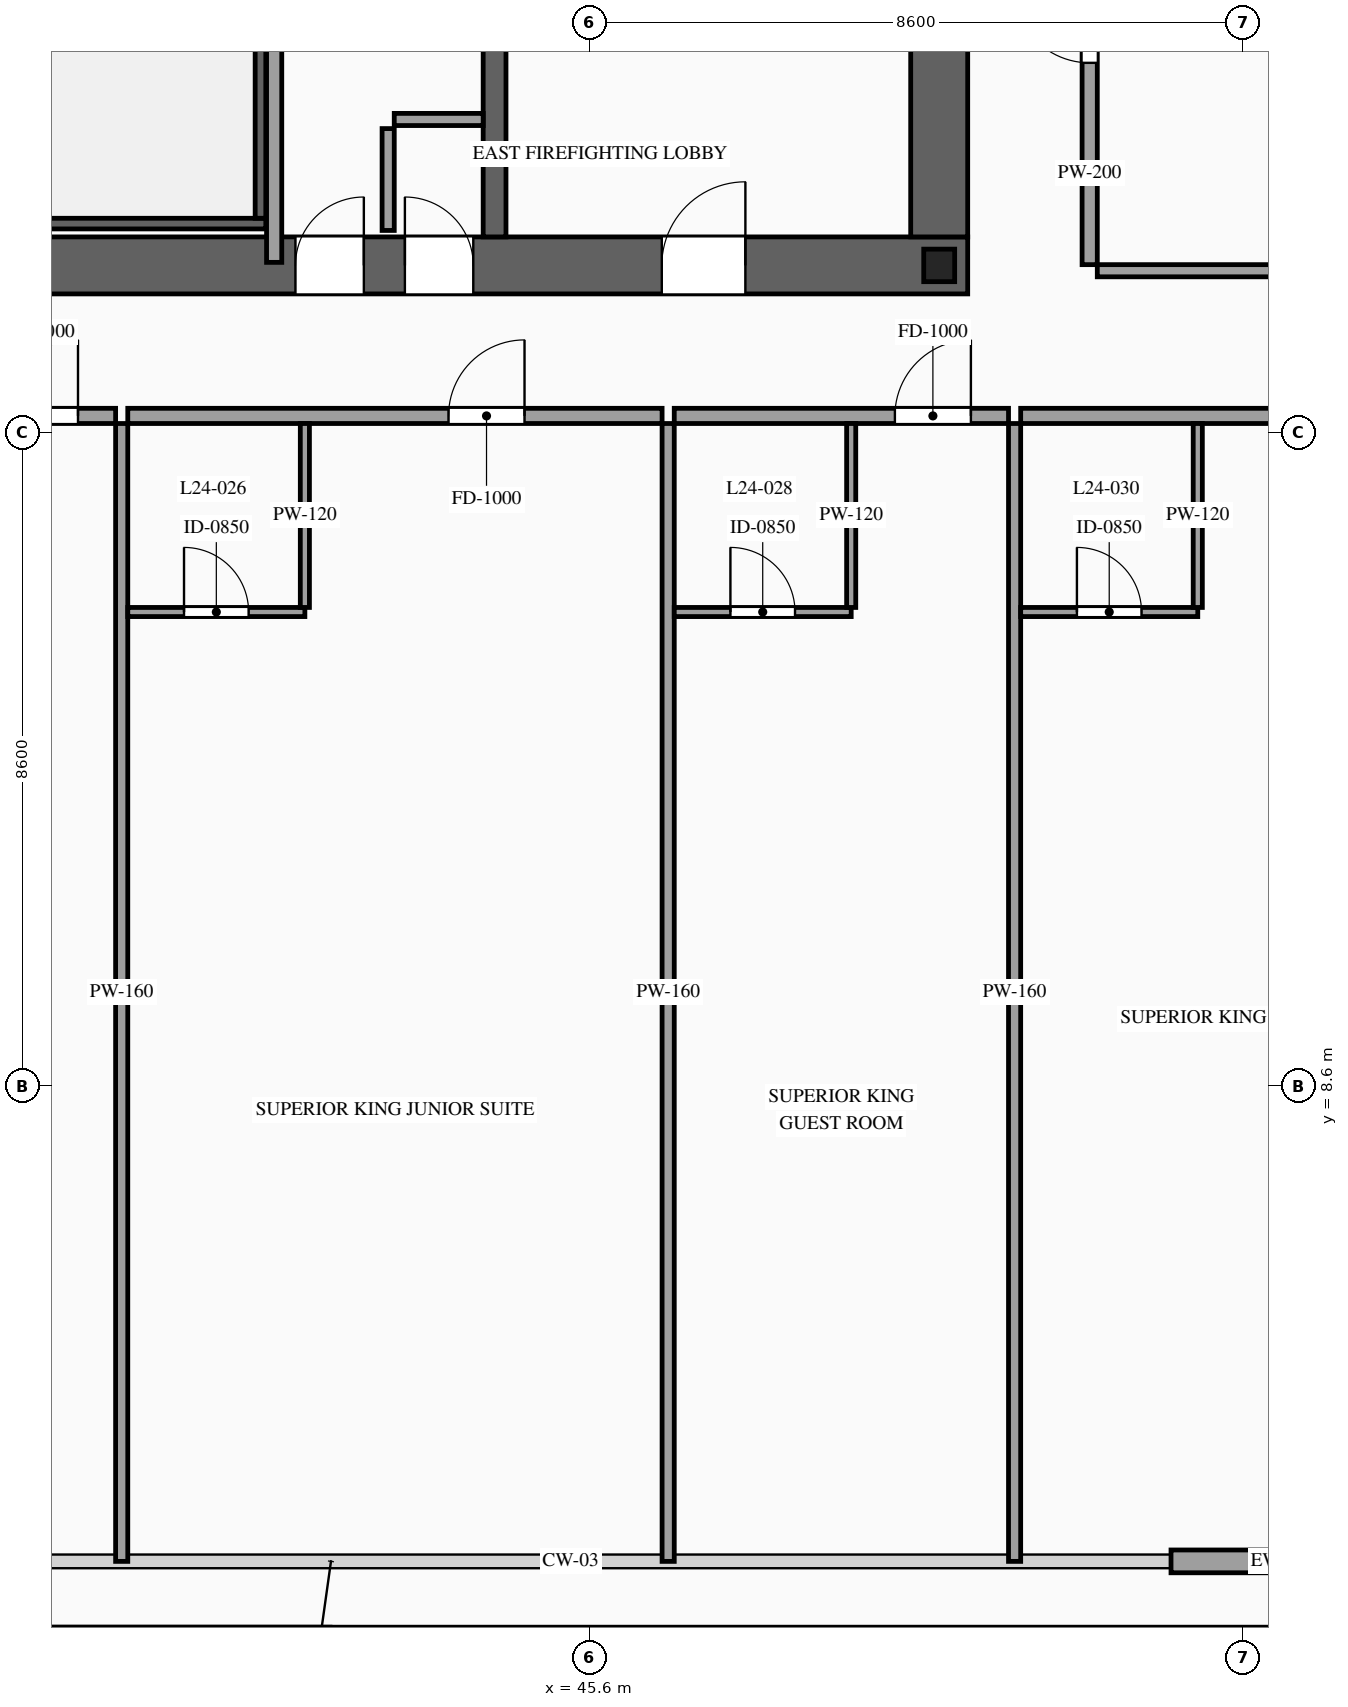
"""IFC4 building model, lengths in metres.
Left out: names, types, materials, properties, quantities, classifications, styles, units other than length and angle.
Written with IfcOpenShell. Run it as: python <this file> out.ifc"""

import sys

from ifc_helpers import new_model, si_unit, direction, frame, frame_2d, origin, origin_2d, place, context, subcontext, project, spatial, rectangle, i_section, extrude, source, transform, mapped, element, fill, save


model = new_model("IFC4")
c1 = context("Model", 3, precision=1e-05, world=origin(), true_north=direction((0.0, 1.0)))
c2 = subcontext(c1, "Body", "Model", "MODEL_VIEW")
j1 = project(units=[si_unit("LENGTHUNIT", "METRE"), si_unit("PLANEANGLEUNIT", "RADIAN")], contexts=[c1])
p1 = place(None, origin())
s1 = spatial("IfcSite", under=j1, at=p1, CompositionType="ELEMENT")
p2 = place(p1, origin())
s2 = spatial("IfcBuilding", under=s1, at=p2, CompositionType="ELEMENT")
p3 = place(p2, frame((0.0, 0.0, 93.8)))
s3 = spatial("IfcBuildingStorey", under=s2, at=p3, CompositionType="ELEMENT", Elevation=93.8)
p4 = place(p3, frame((23.425, 19.4, 0.0), z_axis=(0.0, 0.0, 1.0), x_axis=(1.0, 0.0, 0.0)))
e1 = element("IfcWall", 1, at=p4, inside=s3, PredefinedType="SHEAR", context=c2, shape_type="SweptSolid", body=[
    extrude(rectangle(XDim=27.15, YDim=0.75, at=frame_2d((13.575, 0.0))), origin(), (0.0, 0.0, 1.0), 3.6),
])
p5 = place(p4, frame((2.025, 0.0, 0.0)))
e2 = element("IfcOpeningElement", 2, at=p5, cuts=e1, PredefinedType="OPENING", context=c2, shape_type="SweptSolid", body=[
    extrude(rectangle(XDim=1.1, YDim=2.2, at=frame_2d((0.55, 1.1))), frame((0.0, 0.39, 0.0), z_axis=(0.0, -1.0, 0.0), x_axis=(1.0, 0.0, 0.0)), (0.0, 0.0, 1.0), 0.78),
])
p6 = place(p4, frame((9.925, 0.0, 0.0)))
e3 = element("IfcOpeningElement", 3, at=p6, cuts=e1, PredefinedType="OPENING", context=c2, shape_type="SweptSolid", body=[
    extrude(rectangle(XDim=1.1, YDim=2.2, at=frame_2d((0.55, 1.1))), frame((0.0, 0.39, 0.0), z_axis=(0.0, -1.0, 0.0), x_axis=(1.0, 0.0, 0.0)), (0.0, 0.0, 1.0), 0.78),
])
p7 = place(p4, frame((23.125, 0.0, 0.0)))
e4 = element("IfcOpeningElement", 4, at=p7, cuts=e1, PredefinedType="OPENING", context=c2, shape_type="SweptSolid", body=[
    extrude(rectangle(XDim=1.1, YDim=2.2, at=frame_2d((0.55, 1.1))), frame((0.0, 0.39, 0.0), z_axis=(0.0, -1.0, 0.0), x_axis=(1.0, 0.0, 0.0)), (0.0, 0.0, 1.0), 0.78),
])
p8 = place(p4, frame((19.745, 0.0, 0.0)))
e5 = element("IfcOpeningElement", 5, at=p8, cuts=e1, PredefinedType="OPENING", context=c2, shape_type="SweptSolid", body=[
    extrude(rectangle(XDim=0.9, YDim=2.15, at=frame_2d((0.45, 1.075))), frame((0.0, 0.39, 0.0), z_axis=(0.0, -1.0, 0.0), x_axis=(1.0, 0.0, 0.0)), (0.0, 0.0, 1.0), 0.78),
])
p9 = place(p4, frame((18.305, 0.0, 0.0)))
e6 = element("IfcOpeningElement", 6, at=p9, cuts=e1, PredefinedType="OPENING", context=c2, shape_type="SweptSolid", body=[
    extrude(rectangle(XDim=0.9, YDim=2.15, at=frame_2d((0.45, 1.075))), frame((0.0, 0.39, 0.0), z_axis=(0.0, -1.0, 0.0), x_axis=(1.0, 0.0, 0.0)), (0.0, 0.0, 1.0), 0.78),
])
m1 = source(origin(), c2, "Body", "SweptSolid", [
    extrude(rectangle(XDim=12.05, YDim=0.75, at=frame_2d((6.025, 0.0))), origin(), (0.0, 0.0, 1.0), 3.6),
])
p10 = place(p3, frame((50.2, 19.775, 0.0), z_axis=(0.0, 0.0, 1.0), x_axis=(0.0, 1.0, 0.0)))
e7 = element("IfcWall", 7, at=p10, inside=s3, PredefinedType="SHEAR", context=c2, shape_type="MappedRepresentation", body=[
    mapped(m1, transform((0.0, 0.0, 0.0), scale=1.0)),
])
m2 = source(origin(), c2, "Body", "SweptSolid", [
    extrude(rectangle(XDim=12.05, YDim=0.3, at=frame_2d((6.025, 0.0))), origin(), (0.0, 0.0, 1.0), 3.6),
])
p11 = place(p3, frame((44.35, 19.775, 0.0), z_axis=(0.0, 0.0, 1.0), x_axis=(0.0, 1.0, 0.0)))
e8 = element("IfcWall", 8, at=p11, inside=s3, PredefinedType="SOLIDWALL", context=c2, shape_type="MappedRepresentation", body=[
    mapped(m2, transform((0.0, 0.0, 0.0), scale=1.0)),
])
m3 = source(origin(), c2, "Body", "SweptSolid", [
    extrude(i_section(OverallWidth=0.407, OverallDepth=0.428, WebThickness=0.02, FlangeThickness=0.035, at=origin_2d()), origin(), (0.0, 0.0, 1.0), 3.6),
])
p12 = place(p3, frame((50.2, 19.4, 0.0), z_axis=(0.0, 0.0, 1.0), x_axis=(1.0, 0.0, 0.0)))
e9 = element("IfcColumn", 9, at=p12, inside=s3, PredefinedType="COLUMN", context=c2, shape_type="MappedRepresentation", body=[
    mapped(m3, transform((0.0, 0.0, 0.0), scale=1.0)),
])
m4 = source(origin(), c2, "Body", "SweptSolid", [
    extrude(rectangle(XDim=2.95, YDim=0.3, at=frame_2d((1.475, 0.0))), origin(), (0.0, 0.0, 1.0), 2.775),
])
p13 = place(p3, frame((53.25, 2.35, 0.0), z_axis=(0.0, 0.0, 1.0), x_axis=(1.0, 0.0, 0.0)))
e10 = element("IfcWall", 10, at=p13, inside=s3, PredefinedType="SOLIDWALL", context=c2, shape_type="MappedRepresentation", body=[
    mapped(m4, transform((0.0, 0.0, 0.0), scale=1.0)),
])
m5 = source(origin(), c2, "Body", "SweptSolid", [
    extrude(rectangle(XDim=3.14, YDim=0.14, at=frame_2d((1.57, 0.0))), origin(), (0.0, 0.0, 1.0), 3.38),
])
p14 = place(p3, frame((38.2, 19.95, 0.0), z_axis=(0.0, 0.0, 1.0), x_axis=(1.0, 0.0, 0.0)))
e11 = element("IfcWall", 11, at=p14, inside=s3, PredefinedType="SOLIDWALL", context=c2, shape_type="MappedRepresentation", body=[
    mapped(m5, transform((0.0, 0.0, 0.0), scale=1.0)),
])
m6 = source(origin(), c2, "Body", "SweptSolid", [
    extrude(rectangle(XDim=8.94, YDim=0.14, at=frame_2d((4.47, 0.0))), origin(), (0.0, 0.0, 1.0), 3.38),
])
p15 = place(p3, frame((41.27, 20.02, 0.0), z_axis=(0.0, 0.0, 1.0), x_axis=(0.0, 1.0, 0.0)))
e12 = element("IfcWall", 12, at=p15, inside=s3, PredefinedType="SOLIDWALL", context=c2, shape_type="MappedRepresentation", body=[
    mapped(m6, transform((0.0, 0.0, 0.0), scale=1.0)),
])
m7 = source(origin(), c2, "Body", "SweptSolid", [
    extrude(rectangle(XDim=1.34, YDim=0.16, at=frame_2d((0.67, 0.0))), origin(), (0.0, 0.0, 1.0), 3.38),
])
p16 = place(p3, frame((42.95, 19.86, 0.0), z_axis=(0.0, 0.0, 1.0), x_axis=(0.0, 1.0, 0.0)))
e13 = element("IfcWall", 13, at=p16, inside=s3, PredefinedType="PARTITIONING", context=c2, shape_type="MappedRepresentation", body=[
    mapped(m7, transform((0.0, 0.0, 0.0), scale=1.0)),
])
m8 = source(origin(), c2, "Body", "SweptSolid", [
    extrude(rectangle(XDim=1.17, YDim=0.16, at=frame_2d((0.585, 0.0))), origin(), (0.0, 0.0, 1.0), 3.38),
])
p17 = place(p3, frame((43.03, 21.32, 0.0), z_axis=(0.0, 0.0, 1.0), x_axis=(1.0, 0.0, 0.0)))
e14 = element("IfcWall", 14, at=p17, inside=s3, PredefinedType="PARTITIONING", context=c2, shape_type="MappedRepresentation", body=[
    mapped(m8, transform((0.0, 0.0, 0.0), scale=1.0)),
])
m9 = source(origin(), c2, "Body", "SweptSolid", [
    extrude(rectangle(XDim=6.51, YDim=0.2, at=frame_2d((3.255, 0.0))), origin(), (0.0, 0.0, 1.0), 3.38),
])
p18 = place(p3, frame((41.45, 19.44, 0.0), z_axis=(0.0, 0.0, 1.0), x_axis=(0.0, 1.0, 0.0)))
e15 = element("IfcWall", 15, at=p18, inside=s3, PredefinedType="PARTITIONING", context=c2, shape_type="MappedRepresentation", body=[
    mapped(m9, transform((0.0, 0.0, 0.0), scale=1.0)),
])
p19 = place(p3, frame((34.965, 17.42, 0.0), z_axis=(0.0, 0.0, 1.0), x_axis=(1.0, 0.0, 0.0)))
e16 = element("IfcWall", 16, at=p19, inside=s3, PredefinedType="PARTITIONING", context=c2, shape_type="SweptSolid", body=[
    extrude(rectangle(XDim=4.399, YDim=0.2, at=frame_2d((2.199, 0.0))), origin(), (0.0, 0.0, 1.0), 3.38),
])
p20 = place(p19, frame((2.904, 0.0, 0.0)))
e17 = element("IfcOpeningElement", 17, at=p20, cuts=e16, PredefinedType="OPENING", context=c2, shape_type="SweptSolid", body=[
    extrude(rectangle(XDim=1.0, YDim=2.2, at=frame_2d((0.5, 1.1))), frame((0.0, 0.115, 0.0), z_axis=(0.0, -1.0, 0.0), x_axis=(1.0, 0.0, 0.0)), (0.0, 0.0, 1.0), 0.23),
])
m10 = source(origin(), c2, "Body", "SweptSolid", [
    extrude(rectangle(XDim=14.97, YDim=0.16, at=frame_2d((7.485, 0.0))), origin(), (0.0, 0.0, 1.0), 3.38),
])
p21 = place(p3, frame((39.444, 2.35, 0.0), z_axis=(0.0, 0.0, 1.0), x_axis=(0.0, 1.0, 0.0)))
e18 = element("IfcWall", 18, at=p21, inside=s3, PredefinedType="PARTITIONING", context=c2, shape_type="MappedRepresentation", body=[
    mapped(m10, transform((0.0, 0.0, 0.0), scale=1.0)),
])
p22 = place(p3, frame((39.524, 17.42, 0.0), z_axis=(0.0, 0.0, 1.0), x_axis=(1.0, 0.0, 0.0)))
e19 = element("IfcWall", 19, at=p22, inside=s3, PredefinedType="PARTITIONING", context=c2, shape_type="SweptSolid", body=[
    extrude(rectangle(XDim=7.03, YDim=0.2, at=frame_2d((3.515, 0.0))), origin(), (0.0, 0.0, 1.0), 3.38),
])
p23 = place(p22, frame((4.22, 0.0, 0.0)))
e20 = element("IfcOpeningElement", 20, at=p23, cuts=e19, PredefinedType="OPENING", context=c2, shape_type="SweptSolid", body=[
    extrude(rectangle(XDim=1.0, YDim=2.2, at=frame_2d((0.5, 1.1))), frame((0.0, 0.115, 0.0), z_axis=(0.0, -1.0, 0.0), x_axis=(1.0, 0.0, 0.0)), (0.0, 0.0, 1.0), 0.23),
])
p24 = place(p3, frame((46.634, 2.35, 0.0), z_axis=(0.0, 0.0, 1.0), x_axis=(0.0, 1.0, 0.0)))
e21 = element("IfcWall", 21, at=p24, inside=s3, PredefinedType="PARTITIONING", context=c2, shape_type="MappedRepresentation", body=[
    mapped(m10, transform((0.0, 0.0, 0.0), scale=1.0)),
])
p25 = place(p3, frame((39.524, 14.84, 0.0), z_axis=(0.0, 0.0, 1.0), x_axis=(1.0, 0.0, 0.0)))
e22 = element("IfcWall", 22, at=p25, inside=s3, PredefinedType="PARTITIONING", context=c2, shape_type="SweptSolid", body=[
    extrude(rectangle(XDim=2.33, YDim=0.12, at=frame_2d((1.165, 0.0))), origin(), (0.0, 0.0, 1.0), 3.38),
])
p26 = place(p25, frame((0.74, 0.0, 0.0)))
e23 = element("IfcOpeningElement", 23, at=p26, cuts=e22, PredefinedType="OPENING", context=c2, shape_type="SweptSolid", body=[
    extrude(rectangle(XDim=0.85, YDim=2.1, at=frame_2d((0.425, 1.05))), frame((0.0, 0.075, 0.0), z_axis=(0.0, -1.0, 0.0), x_axis=(1.0, 0.0, 0.0)), (0.0, 0.0, 1.0), 0.15),
])
m11 = source(origin(), c2, "Body", "SweptSolid", [
    extrude(rectangle(XDim=2.42, YDim=0.12, at=frame_2d((1.21, 0.0))), origin(), (0.0, 0.0, 1.0), 3.38),
])
p27 = place(p3, frame((41.854, 14.9, 0.0), z_axis=(0.0, 0.0, 1.0), x_axis=(0.0, 1.0, 0.0)))
e24 = element("IfcWall", 24, at=p27, inside=s3, PredefinedType="PARTITIONING", context=c2, shape_type="MappedRepresentation", body=[
    mapped(m11, transform((0.0, 0.0, 0.0), scale=1.0)),
])
p28 = place(p3, frame((46.714, 17.42, 0.0), z_axis=(0.0, 0.0, 1.0), x_axis=(1.0, 0.0, 0.0)))
e25 = element("IfcWall", 25, at=p28, inside=s3, PredefinedType="PARTITIONING", context=c2, shape_type="SweptSolid", body=[
    extrude(rectangle(XDim=4.398, YDim=0.2, at=frame_2d((2.199, 0.0))), origin(), (0.0, 0.0, 1.0), 3.38),
])
p29 = place(p28, frame((2.903, 0.0, 0.0)))
e26 = element("IfcOpeningElement", 26, at=p29, cuts=e25, PredefinedType="OPENING", context=c2, shape_type="SweptSolid", body=[
    extrude(rectangle(XDim=1.0, YDim=2.2, at=frame_2d((0.5, 1.1))), frame((0.0, 0.115, 0.0), z_axis=(0.0, -1.0, 0.0), x_axis=(1.0, 0.0, 0.0)), (0.0, 0.0, 1.0), 0.23),
])
p30 = place(p3, frame((51.192, 2.35, 0.0), z_axis=(0.0, 0.0, 1.0), x_axis=(0.0, 1.0, 0.0)))
e27 = element("IfcWall", 27, at=p30, inside=s3, PredefinedType="PARTITIONING", context=c2, shape_type="MappedRepresentation", body=[
    mapped(m10, transform((0.0, 0.0, 0.0), scale=1.0)),
])
p31 = place(p3, frame((46.714, 14.84, 0.0), z_axis=(0.0, 0.0, 1.0), x_axis=(1.0, 0.0, 0.0)))
e28 = element("IfcWall", 28, at=p31, inside=s3, PredefinedType="PARTITIONING", context=c2, shape_type="SweptSolid", body=[
    extrude(rectangle(XDim=2.328, YDim=0.12, at=frame_2d((1.164, 0.0))), origin(), (0.0, 0.0, 1.0), 3.38),
])
p32 = place(p31, frame((0.739, 0.0, 0.0)))
e29 = element("IfcOpeningElement", 29, at=p32, cuts=e28, PredefinedType="OPENING", context=c2, shape_type="SweptSolid", body=[
    extrude(rectangle(XDim=0.85, YDim=2.1, at=frame_2d((0.425, 1.05))), frame((0.0, 0.075, 0.0), z_axis=(0.0, -1.0, 0.0), x_axis=(1.0, 0.0, 0.0)), (0.0, 0.0, 1.0), 0.15),
])
p33 = place(p3, frame((49.042, 14.9, 0.0), z_axis=(0.0, 0.0, 1.0), x_axis=(0.0, 1.0, 0.0)))
e30 = element("IfcWall", 30, at=p33, inside=s3, PredefinedType="PARTITIONING", context=c2, shape_type="MappedRepresentation", body=[
    mapped(m11, transform((0.0, 0.0, 0.0), scale=1.0)),
])
p34 = place(p3, frame((51.272, 17.42, 0.0), z_axis=(0.0, 0.0, 1.0), x_axis=(1.0, 0.0, 0.0)))
e31 = element("IfcWall", 31, at=p34, inside=s3, PredefinedType="PARTITIONING", context=c2, shape_type="SweptSolid", body=[
    extrude(rectangle(XDim=6.288, YDim=0.2, at=frame_2d((3.144, 0.0))), origin(), (0.0, 0.0, 1.0), 3.38),
])
p35 = place(p34, frame((3.849, 0.0, 0.0)))
e32 = element("IfcOpeningElement", 32, at=p35, cuts=e31, PredefinedType="OPENING", context=c2, shape_type="SweptSolid", body=[
    extrude(rectangle(XDim=1.0, YDim=2.2, at=frame_2d((0.5, 1.1))), frame((0.0, 0.115, 0.0), z_axis=(0.0, -1.0, 0.0), x_axis=(1.0, 0.0, 0.0)), (0.0, 0.0, 1.0), 0.23),
])
p36 = place(p3, frame((51.272, 14.84, 0.0), z_axis=(0.0, 0.0, 1.0), x_axis=(1.0, 0.0, 0.0)))
e33 = element("IfcWall", 33, at=p36, inside=s3, PredefinedType="PARTITIONING", context=c2, shape_type="SweptSolid", body=[
    extrude(rectangle(XDim=2.33, YDim=0.12, at=frame_2d((1.165, 0.0))), origin(), (0.0, 0.0, 1.0), 3.38),
])
p37 = place(p36, frame((0.74, 0.0, 0.0)))
e34 = element("IfcOpeningElement", 34, at=p37, cuts=e33, PredefinedType="OPENING", context=c2, shape_type="SweptSolid", body=[
    extrude(rectangle(XDim=0.85, YDim=2.1, at=frame_2d((0.425, 1.05))), frame((0.0, 0.075, 0.0), z_axis=(0.0, -1.0, 0.0), x_axis=(1.0, 0.0, 0.0)), (0.0, 0.0, 1.0), 0.15),
])
p38 = place(p3, frame((53.602, 14.9, 0.0), z_axis=(0.0, 0.0, 1.0), x_axis=(0.0, 1.0, 0.0)))
e35 = element("IfcWall", 35, at=p38, inside=s3, PredefinedType="PARTITIONING", context=c2, shape_type="MappedRepresentation", body=[
    mapped(m11, transform((0.0, 0.0, 0.0), scale=1.0)),
])
p39 = place(p3, frame((52.18, 19.41, 0.0), z_axis=(0.0, 0.0, 1.0), x_axis=(0.0, 1.0, 0.0)))
e36 = element("IfcWall", 36, at=p39, inside=s3, PredefinedType="PARTITIONING", context=c2, shape_type="SweptSolid", body=[
    extrude(rectangle(XDim=6.31, YDim=0.2, at=frame_2d((3.155, 0.0))), origin(), (0.0, 0.0, 1.0), 3.38),
])
p40 = place(p39, frame((2.655, 0.0, 0.0)))
e37 = element("IfcOpeningElement", 37, at=p40, cuts=e36, PredefinedType="OPENING", context=c2, shape_type="SweptSolid", body=[
    extrude(rectangle(XDim=1.0, YDim=2.2, at=frame_2d((0.5, 1.1))), frame((0.0, 0.115, 0.0), z_axis=(0.0, -1.0, 0.0), x_axis=(1.0, 0.0, 0.0)), (0.0, 0.0, 1.0), 0.23),
])
m12 = source(origin(), c2, "Body", "SweptSolid", [
    extrude(rectangle(XDim=8.17, YDim=0.16, at=frame_2d((4.085, 0.0))), origin(), (0.0, 0.0, 1.0), 2.875),
])
p41 = place(p3, frame((52.28, 19.33, 0.0), z_axis=(0.0, 0.0, 1.0), x_axis=(1.0, 0.0, 0.0)))
e38 = element("IfcWall", 38, at=p41, inside=s3, PredefinedType="PARTITIONING", context=c2, shape_type="MappedRepresentation", body=[
    mapped(m12, transform((0.0, 0.0, 0.0), scale=1.0)),
])
m13 = source(origin(), c2, "Body", "SweptSolid", [
    extrude(rectangle(XDim=1.1, YDim=2.2, at=frame_2d((0.55, 1.1))), frame((0.0, 0.025, 0.0), z_axis=(0.0, -1.0, 0.0), x_axis=(1.0, 0.0, 0.0)), (0.0, 0.0, 1.0), 0.05),
])
p42 = place(p7, origin())
e39 = element("IfcDoor", 39, at=p42, inside=s3, OperationType="SINGLE_SWING_RIGHT", PredefinedType="DOOR", context=c2, shape_type="MappedRepresentation", body=[
    mapped(m13, transform((0.0, 0.0, 0.0), scale=1.0)),
])
fill(e4, e39)
m14 = source(origin(), c2, "Body", "SweptSolid", [
    extrude(rectangle(XDim=0.9, YDim=2.15, at=frame_2d((0.45, 1.075))), frame((0.0, 0.025, 0.0), z_axis=(0.0, -1.0, 0.0), x_axis=(1.0, 0.0, 0.0)), (0.0, 0.0, 1.0), 0.05),
])
p43 = place(p8, origin())
e40 = element("IfcDoor", 40, at=p43, inside=s3, OperationType="SINGLE_SWING_LEFT", PredefinedType="DOOR", context=c2, shape_type="MappedRepresentation", body=[
    mapped(m14, transform((0.0, 0.0, 0.0), scale=1.0)),
])
fill(e5, e40)
p44 = place(p9, origin())
e41 = element("IfcDoor", 41, at=p44, inside=s3, OperationType="SINGLE_SWING_RIGHT", PredefinedType="DOOR", context=c2, shape_type="MappedRepresentation", body=[
    mapped(m14, transform((0.0, 0.0, 0.0), scale=1.0)),
])
fill(e6, e41)
m15 = source(origin(), c2, "Body", "SweptSolid", [
    extrude(rectangle(XDim=1.0, YDim=2.2, at=frame_2d((0.5, 1.1))), frame((0.0, 0.025, 0.0), z_axis=(0.0, -1.0, 0.0), x_axis=(1.0, 0.0, 0.0)), (0.0, 0.0, 1.0), 0.05),
])
p45 = place(p20, origin())
e42 = element("IfcDoor", 42, at=p45, inside=s3, OperationType="SINGLE_SWING_RIGHT", PredefinedType="DOOR", context=c2, shape_type="MappedRepresentation", body=[
    mapped(m15, transform((0.0, 0.0, 0.0), scale=1.0)),
])
fill(e17, e42)
p46 = place(p23, origin())
e43 = element("IfcDoor", 43, at=p46, inside=s3, OperationType="SINGLE_SWING_RIGHT", PredefinedType="DOOR", context=c2, shape_type="MappedRepresentation", body=[
    mapped(m15, transform((0.0, 0.0, 0.0), scale=1.0)),
])
fill(e20, e43)
m16 = source(origin(), c2, "Body", "SweptSolid", [
    extrude(rectangle(XDim=0.85, YDim=2.1, at=frame_2d((0.425, 1.05))), frame((0.0, 0.025, 0.0), z_axis=(0.0, -1.0, 0.0), x_axis=(1.0, 0.0, 0.0)), (0.0, 0.0, 1.0), 0.05),
])
p47 = place(p26, origin())
e44 = element("IfcDoor", 44, at=p47, inside=s3, OperationType="SINGLE_SWING_LEFT", PredefinedType="DOOR", context=c2, shape_type="MappedRepresentation", body=[
    mapped(m16, transform((0.0, 0.0, 0.0), scale=1.0)),
])
fill(e23, e44)
p48 = place(p29, origin())
e45 = element("IfcDoor", 45, at=p48, inside=s3, OperationType="SINGLE_SWING_RIGHT", PredefinedType="DOOR", context=c2, shape_type="MappedRepresentation", body=[
    mapped(m15, transform((0.0, 0.0, 0.0), scale=1.0)),
])
fill(e26, e45)
p49 = place(p32, origin())
e46 = element("IfcDoor", 46, at=p49, inside=s3, OperationType="SINGLE_SWING_LEFT", PredefinedType="DOOR", context=c2, shape_type="MappedRepresentation", body=[
    mapped(m16, transform((0.0, 0.0, 0.0), scale=1.0)),
])
fill(e29, e46)
p50 = place(p37, origin())
e47 = element("IfcDoor", 47, at=p50, inside=s3, OperationType="SINGLE_SWING_LEFT", PredefinedType="DOOR", context=c2, shape_type="MappedRepresentation", body=[
    mapped(m16, transform((0.0, 0.0, 0.0), scale=1.0)),
])
fill(e34, e47)
p51 = place(p40, origin())
e48 = element("IfcDoor", 48, at=p51, inside=s3, OperationType="SINGLE_SWING_RIGHT", PredefinedType="DOOR", context=c2, shape_type="MappedRepresentation", body=[
    mapped(m15, transform((0.0, 0.0, 0.0), scale=1.0)),
])
fill(e37, e48)
save(model, sys.argv[1])
